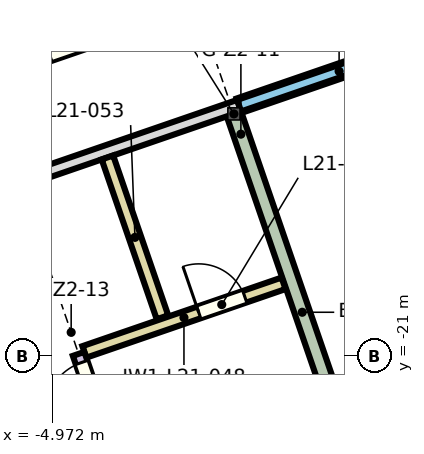
"""IFC4 building model, lengths in metres.
Left out: names, types, materials, properties, quantities, classifications, styles, units other than length and angle.
Written with IfcOpenShell. Run it as: python <this file> out.ifc"""

import sys

from ifc_helpers import new_model, si_unit, direction, frame, frame_2d, origin, place, context, subcontext, project, spatial, rectangle, extrude, element, fill, save


model = new_model("IFC4")
c1 = context("Model", 3, precision=1e-05, world=origin(), true_north=direction((0.0, 1.0)))
c2 = subcontext(c1, "Body", "Model", "MODEL_VIEW")
j1 = project(units=[si_unit("LENGTHUNIT", "METRE"), si_unit("PLANEANGLEUNIT", "RADIAN")], contexts=[c1])
p1 = place(None, origin())
s1 = spatial("IfcSite", under=j1, at=p1, CompositionType="ELEMENT")
p2 = place(p1, origin())
s2 = spatial("IfcBuilding", under=s1, at=p2, CompositionType="ELEMENT")
p3 = place(p2, frame((0.0, 0.0, 107.9)))
s3 = spatial("IfcBuildingStorey", under=s2, at=p3, CompositionType="ELEMENT", Elevation=107.9)
p4 = place(p3, frame((0.263, -23.494, 0.0), z_axis=(0.0, 0.0, 1.0), x_axis=(-0.325585020105, 0.945512768123, 0.0)))
e1 = element("IfcWall", 1, at=p4, inside=s3, PredefinedType="SOLIDWALL", context=c2, shape_type="SweptSolid", body=[
    extrude(rectangle(XDim=6.9, YDim=0.25, at=frame_2d((3.45, 0.0))), origin(), (0.0, 0.0, 1.0), 2.795),
])
p5 = place(p3, frame((-1.897, -16.835, 2.868), z_axis=(0.0, 0.0, 1.0), x_axis=(0.945520584071, 0.325562321375, 0.0)))
e2 = element("IfcWall", 2, at=p5, inside=s3, PredefinedType="SOLIDWALL", context=c2, shape_type="SweptSolid", body=[
    extrude(rectangle(XDim=3.478, YDim=0.25, at=frame_2d((1.739, 0.0))), origin(), (0.0, 0.0, 1.0), 0.632),
])
p6 = place(p3, frame((-12.605, -20.522, 0.0), z_axis=(0.0, 0.0, 1.0), x_axis=(0.945519963328, 0.325564124172, 0.0)))
e3 = element("IfcWall", 3, at=p6, inside=s3, PredefinedType="PARTITIONING", context=c2, shape_type="SweptSolid", body=[
    extrude(rectangle(XDim=11.325, YDim=0.2, at=frame_2d((5.663, 0.0))), origin(), (0.0, 0.0, 1.0), 3.55),
])
p7 = place(p6, frame((5.9, 0.0, 0.0)))
e4 = element("IfcOpeningElement", 4, at=p7, cuts=e3, PredefinedType="OPENING", context=c2, shape_type="SweptSolid", body=[
    extrude(rectangle(XDim=1.0, YDim=2.1, at=frame_2d((0.5, 1.05))), frame((0.0, 0.11, 0.0), z_axis=(0.0, -1.0, 0.0), x_axis=(1.0, 0.0, 0.0)), (0.0, 0.0, 1.0), 0.22),
])
p8 = place(p6, frame((0.25, 0.0, 0.0)))
e5 = element("IfcOpeningElement", 5, at=p8, cuts=e3, PredefinedType="OPENING", context=c2, shape_type="SweptSolid", body=[
    extrude(rectangle(XDim=1.0, YDim=2.1, at=frame_2d((0.5, 1.05))), frame((0.0, 0.11, 0.0), z_axis=(0.0, -1.0, 0.0), x_axis=(1.0, 0.0, 0.0)), (0.0, 0.0, 1.0), 0.22),
])
p9 = place(p3, frame((-11.49, -18.234, 0.0), z_axis=(0.0, 0.0, 1.0), x_axis=(0.945519622926, 0.325565112782, 0.0)))
e6 = element("IfcWall", 6, at=p9, inside=s3, PredefinedType="PARTITIONING", context=c2, shape_type="SweptSolid", body=[
    extrude(rectangle(XDim=28.873, YDim=0.2, at=frame_2d((14.437, 0.0))), origin(), (0.0, 0.0, 1.0), 3.55),
])
p10 = place(p9, frame((6.851, 0.0, 0.0)))
e7 = element("IfcOpeningElement", 7, at=p10, cuts=e6, PredefinedType="OPENING", context=c2, shape_type="SweptSolid", body=[
    extrude(rectangle(XDim=0.9, YDim=2.1, at=frame_2d((0.45, 1.05))), frame((0.0, 0.11, 0.0), z_axis=(0.0, -1.0, 0.0), x_axis=(1.0, 0.0, 0.0)), (0.0, 0.0, 1.0), 0.22),
])
p11 = place(p9, frame((16.557, 0.0, 0.0)))
e8 = element("IfcOpeningElement", 8, at=p11, cuts=e6, PredefinedType="OPENING", context=c2, shape_type="SweptSolid", body=[
    extrude(rectangle(XDim=0.9, YDim=2.1, at=frame_2d((0.45, 1.05))), frame((0.0, 0.11, 0.0), z_axis=(0.0, -1.0, 0.0), x_axis=(1.0, 0.0, 0.0)), (0.0, 0.0, 1.0), 0.22),
])
p12 = place(p9, frame((11.152, 0.0, 0.0)))
e9 = element("IfcOpeningElement", 9, at=p12, cuts=e6, PredefinedType="OPENING", context=c2, shape_type="SweptSolid", body=[
    extrude(rectangle(XDim=2.0, YDim=2.1, at=frame_2d((1.0, 1.05))), frame((0.0, 0.11, 0.0), z_axis=(0.0, -1.0, 0.0), x_axis=(1.0, 0.0, 0.0)), (0.0, 0.0, 1.0), 0.22),
])
p13 = place(p3, frame((-4.443, -20.884, 0.0), z_axis=(0.0, 0.0, 1.0), x_axis=(0.945515898571, 0.325575929009, 0.0)))
e10 = element("IfcWall", 10, at=p13, inside=s3, PredefinedType="PARTITIONING", context=c2, shape_type="SweptSolid", body=[
    extrude(rectangle(XDim=3.465, YDim=0.2, at=frame_2d((1.732, 0.0))), origin(), (0.0, 0.0, 1.0), 3.55),
])
p14 = place(p13, frame((1.99, 0.0, 0.0)))
e11 = element("IfcOpeningElement", 11, at=p14, cuts=e10, PredefinedType="OPENING", context=c2, shape_type="SweptSolid", body=[
    extrude(rectangle(XDim=0.8, YDim=2.1, at=frame_2d((0.4, 1.05))), frame((0.0, 0.11, 0.0), z_axis=(0.0, -1.0, 0.0), x_axis=(1.0, 0.0, 0.0)), (0.0, 0.0, 1.0), 0.22),
])
p15 = place(p3, frame((-3.158, -20.315, 0.0), z_axis=(0.0, 0.0, 1.0), x_axis=(-0.325538681008, 0.945528723608, 0.0)))
e12 = element("IfcWall", 12, at=p15, inside=s3, PredefinedType="PARTITIONING", context=c2, shape_type="SweptSolid", body=[
    extrude(rectangle(XDim=2.78, YDim=0.2, at=frame_2d((1.39, 0.0))), origin(), (0.0, 0.0, 1.0), 3.55),
])
p16 = place(p3, frame((-3.082, -25.143, 0.0), z_axis=(0.0, 0.0, 1.0), x_axis=(-0.325568171973, 0.945518569568, 0.0)))
e13 = element("IfcWall", 13, at=p16, inside=s3, PredefinedType="PARTITIONING", context=c2, shape_type="SweptSolid", body=[
    extrude(rectangle(XDim=4.47, YDim=0.2, at=frame_2d((2.235, 0.0))), origin(), (0.0, 0.0, 1.0), 3.05),
])
p17 = place(p16, frame((3.42, 0.0, 0.0)))
e14 = element("IfcOpeningElement", 14, at=p17, cuts=e13, PredefinedType="OPENING", context=c2, shape_type="SweptSolid", body=[
    extrude(rectangle(XDim=0.9, YDim=2.1, at=frame_2d((0.45, 1.05))), frame((0.0, 0.11, 0.0), z_axis=(0.0, -1.0, 0.0), x_axis=(1.0, 0.0, 0.0)), (0.0, 0.0, 1.0), 0.22),
])
p18 = place(p10, origin())
e15 = element("IfcDoor", 15, at=p18, inside=s3, OperationType="NOTDEFINED", PredefinedType="DOOR", context=c2, shape_type="SweptSolid", body=[
    extrude(rectangle(XDim=0.9, YDim=2.1, at=frame_2d((0.45, 1.05))), frame((0.0, 0.025, 0.0), z_axis=(0.0, -1.0, 0.0), x_axis=(1.0, 0.0, 0.0)), (0.0, 0.0, 1.0), 0.05),
])
fill(e7, e15)
p19 = place(p17, origin())
e16 = element("IfcDoor", 16, at=p19, inside=s3, OperationType="NOTDEFINED", PredefinedType="DOOR", context=c2, shape_type="SweptSolid", body=[
    extrude(rectangle(XDim=0.9, YDim=2.1, at=frame_2d((0.45, 1.05))), frame((0.0, 0.025, 0.0), z_axis=(0.0, -1.0, 0.0), x_axis=(1.0, 0.0, 0.0)), (0.0, 0.0, 1.0), 0.05),
])
fill(e14, e16)
p20 = place(p14, origin())
e17 = element("IfcDoor", 17, at=p20, inside=s3, OperationType="NOTDEFINED", PredefinedType="DOOR", context=c2, shape_type="SweptSolid", body=[
    extrude(rectangle(XDim=0.8, YDim=2.1, at=frame_2d((0.4, 1.05))), frame((0.0, 0.025, 0.0), z_axis=(0.0, -1.0, 0.0), x_axis=(1.0, 0.0, 0.0)), (0.0, 0.0, 1.0), 0.05),
])
fill(e11, e17)
save(model, sys.argv[1])
